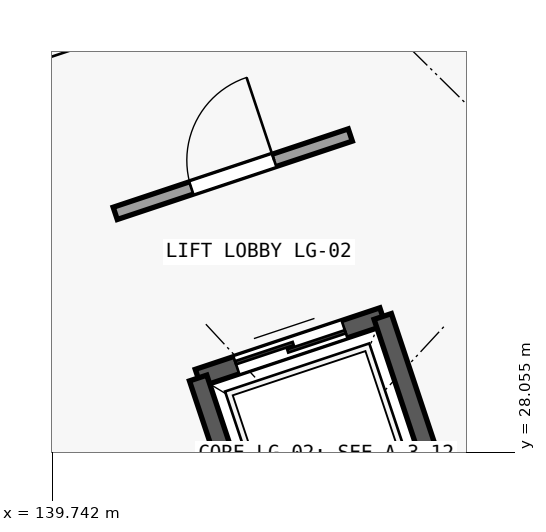
"""IFC4 building model, lengths in metres.
Left out: names, types, materials, properties, quantities, classifications, styles, units other than length and angle.
Written with IfcOpenShell. Run it as: python <this file> out.ifc"""

import sys

from ifc_helpers import new_model, si_unit, direction, frame, frame_2d, origin, place, context, subcontext, project, spatial, rectangle, extrude, element, fill, save


model = new_model("IFC4")
c1 = context("Model", 3, precision=1e-05, world=origin(), true_north=direction((0.0, 1.0)))
c2 = subcontext(c1, "Body", "Model", "MODEL_VIEW")
j1 = project(units=[si_unit("LENGTHUNIT", "METRE"), si_unit("PLANEANGLEUNIT", "RADIAN")], contexts=[c1])
p1 = place(None, origin())
s1 = spatial("IfcSite", under=j1, at=p1, CompositionType="ELEMENT")
p2 = place(p1, origin())
s2 = spatial("IfcBuilding", under=s1, at=p2, CompositionType="ELEMENT")
p3 = place(p2, frame((0.0, 0.0, 5.4)))
s3 = spatial("IfcBuildingStorey", under=s2, at=p3, CompositionType="ELEMENT", Elevation=5.4)
p4 = place(p3, frame((141.664, 29.032, 0.0), z_axis=(0.0, 0.0, 1.0), x_axis=(0.948673760334, 0.316256377729, 0.0)))
e1 = element("IfcWall", 1, at=p4, inside=s3, PredefinedType="SOLIDWALL", context=c2, shape_type="SweptSolid", body=[
    extrude(rectangle(XDim=2.56, YDim=0.24, at=frame_2d((1.28, 0.0))), origin(), (0.0, 0.0, 1.0), 3.64),
])
p5 = place(p4, frame((0.53, 0.0, 0.0)))
e2 = element("IfcOpeningElement", 2, at=p5, cuts=e1, PredefinedType="OPENING", context=c2, shape_type="SweptSolid", body=[
    extrude(rectangle(XDim=1.5, YDim=2.25, at=frame_2d((0.75, 1.125))), frame((0.0, 0.13, 0.0), z_axis=(0.0, -1.0, 0.0), x_axis=(1.0, 0.0, 0.0)), (0.0, 0.0, 1.0), 0.26),
])
for number, where, z_axis, x_axis in (
    (3, (142.6, 26.224, 0.0), (0.0, 0.0, 1.0), (-0.316, 0.949, 0.0)),
    (4, (144.093, 29.842, 0.0), (0.0, 0.0, 1.0), (0.316, -0.949, 0.0)),
):
    element("IfcWall", number, at=place(p3, frame(where, z_axis=z_axis, x_axis=x_axis)), inside=s3, PredefinedType="SOLIDWALL", context=c2, shape_type="SweptSolid", body=[
        extrude(rectangle(XDim=2.96, YDim=0.24, at=frame_2d((1.48, 0.0))), origin(), (0.0, 0.0, 1.0), 3.64),
    ])
p6 = place(p3, frame((140.573, 31.198, 0.0), z_axis=(0.0, 0.0, 1.0), x_axis=(0.948698274856, 0.316182832053, 0.0)))
e5 = element("IfcWall", 5, at=p6, inside=s3, PredefinedType="PARTITIONING", context=c2, shape_type="SweptSolid", body=[
    extrude(rectangle(XDim=3.26, YDim=0.17, at=frame_2d((1.63, 0.0))), origin(), (0.0, 0.0, 1.0), 3.64),
])
p7 = place(p6, frame((1.055, 0.0, 0.0)))
e6 = element("IfcOpeningElement", 6, at=p7, cuts=e5, PredefinedType="OPENING", context=c2, shape_type="SweptSolid", body=[
    extrude(rectangle(XDim=1.15, YDim=2.15, at=frame_2d((0.575, 1.075))), frame((0.0, 0.095, 0.0), z_axis=(0.0, -1.0, 0.0), x_axis=(1.0, 0.0, 0.0)), (0.0, 0.0, 1.0), 0.19),
])
p8 = place(p5, origin())
e7 = element("IfcDoor", 7, at=p8, inside=s3, OperationType="DOUBLE_DOOR_SLIDING", PredefinedType="DOOR", context=c2, shape_type="SweptSolid", body=[
    extrude(rectangle(XDim=1.5, YDim=2.25, at=frame_2d((0.75, 1.125))), frame((0.0, 0.025, 0.0), z_axis=(0.0, -1.0, 0.0), x_axis=(1.0, 0.0, 0.0)), (0.0, 0.0, 1.0), 0.05),
])
fill(e2, e7)
p9 = place(p7, origin())
e8 = element("IfcDoor", 8, at=p9, inside=s3, OperationType="SINGLE_SWING_RIGHT", PredefinedType="DOOR", context=c2, shape_type="SweptSolid", body=[
    extrude(rectangle(XDim=1.15, YDim=2.15, at=frame_2d((0.575, 1.075))), frame((0.0, 0.025, 0.0), z_axis=(0.0, -1.0, 0.0), x_axis=(1.0, 0.0, 0.0)), (0.0, 0.0, 1.0), 0.05),
])
fill(e6, e8)
save(model, sys.argv[1])
